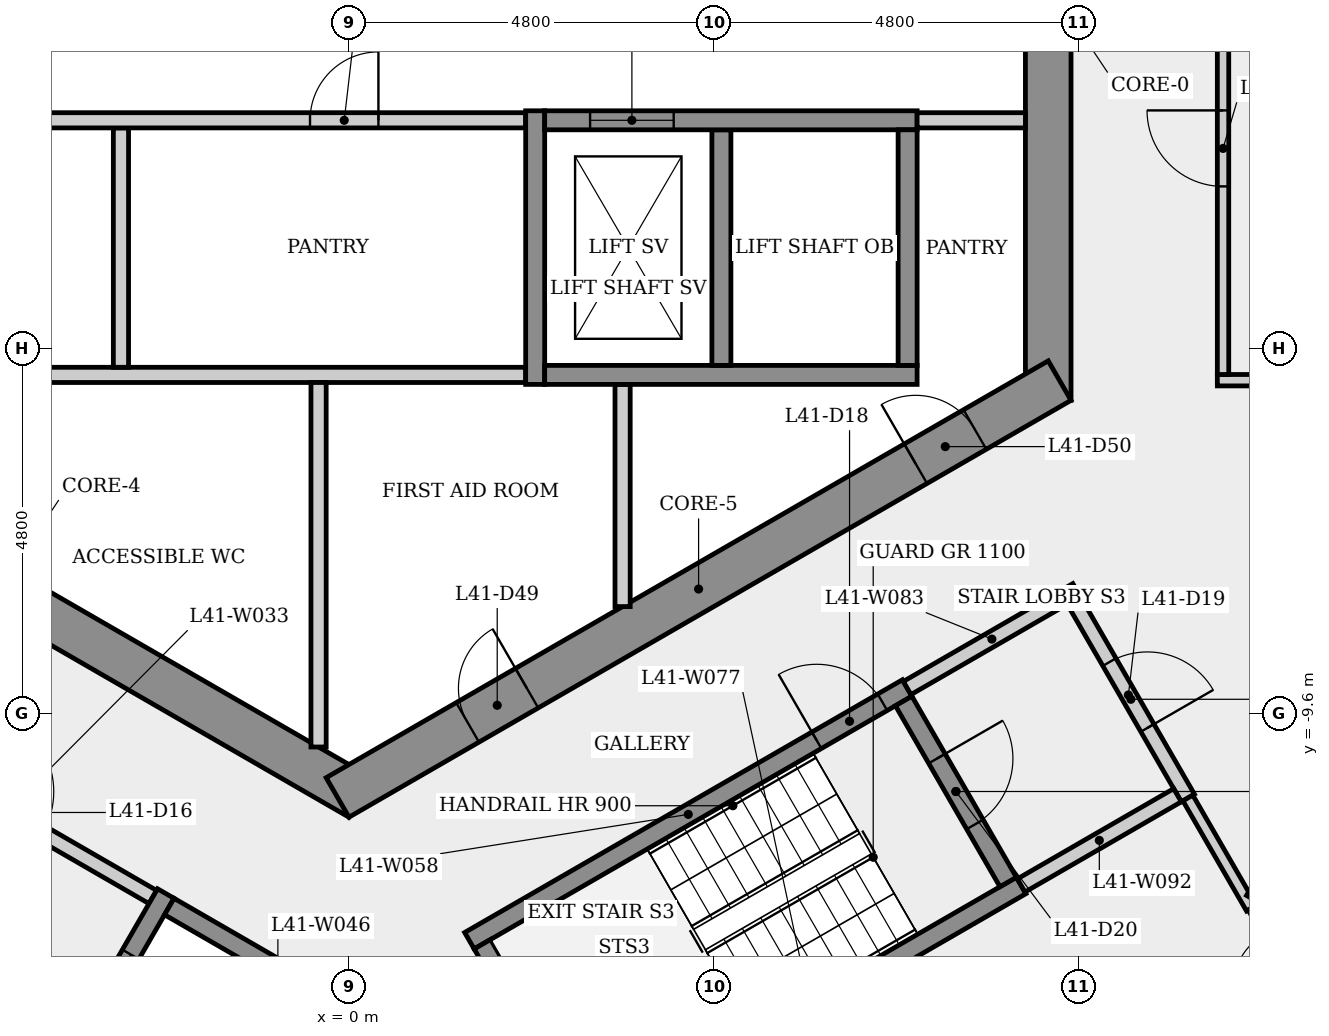
"""IFC4 building model, lengths in metres.
Left out: names, types, materials, properties, quantities, classifications, styles, units other than length and angle.
Written with IfcOpenShell. Run it as: python <this file> out.ifc"""

import sys

from ifc_helpers import new_model, si_unit, direction, frame, frame_2d, origin, place, context, subcontext, project, spatial, rectangle, extrude, element, fill, save


model = new_model("IFC4")
c1 = context("Model", 3, precision=1e-05, world=origin(), true_north=direction((0.0, 1.0)))
c2 = subcontext(c1, "Body", "Model", "MODEL_VIEW")
j1 = project(units=[si_unit("LENGTHUNIT", "METRE"), si_unit("PLANEANGLEUNIT", "RADIAN")], contexts=[c1])
p1 = place(None, origin())
s1 = spatial("IfcSite", under=j1, at=p1, CompositionType="ELEMENT")
p2 = place(p1, origin())
s2 = spatial("IfcBuilding", under=s1, at=p2, CompositionType="ELEMENT")
p3 = place(p2, frame((0.0, 0.0, 156.1)))
s3 = spatial("IfcBuildingStorey", under=s2, at=p3, CompositionType="ELEMENT", Elevation=156.1)
p4 = place(p3, frame((9.2, -5.485, 0.0), z_axis=(0.0, 0.0, 1.0), x_axis=(0.0, 1.0, 0.0)))
e1 = element("IfcWall", 1, at=p4, inside=s3, PredefinedType="SHEAR", context=c2, shape_type="SweptSolid", body=[
    extrude(rectangle(XDim=10.97, YDim=0.6, at=frame_2d((5.485, 0.0))), origin(), (0.0, 0.0, 1.0), 3.4),
])
p5 = place(p4, frame((4.685, 0.0, 0.0)))
e2 = element("IfcOpeningElement", 2, at=p5, cuts=e1, PredefinedType="OPENING", context=c2, shape_type="SweptSolid", body=[
    extrude(rectangle(XDim=1.6, YDim=2.1, at=frame_2d((0.8, 1.05))), frame((0.0, 0.31, 0.0), z_axis=(0.0, -1.0, 0.0), x_axis=(1.0, 0.0, 0.0)), (0.0, 0.0, 1.0), 0.62),
])
p6 = place(p3, frame((-9.35, -5.225, 0.0), z_axis=(0.0, 0.0, 1.0), x_axis=(0.866023993627, -0.500002442456, 0.0)))
e3 = element("IfcWall", 3, at=p6, inside=s3, PredefinedType="SHEAR", context=c2, shape_type="SweptSolid", body=[
    extrude(rectangle(XDim=10.97, YDim=0.6, at=frame_2d((5.485, 0.0))), origin(), (0.0, 0.0, 1.0), 3.4),
])
p7 = place(p6, frame((4.816, 0.0, 0.0)))
e4 = element("IfcOpeningElement", 4, at=p7, cuts=e3, PredefinedType="OPENING", context=c2, shape_type="SweptSolid", body=[
    extrude(rectangle(XDim=0.9, YDim=2.1, at=frame_2d((0.45, 1.05))), frame((0.0, 0.31, 0.0), z_axis=(0.0, -1.0, 0.0), x_axis=(1.0, 0.0, 0.0)), (0.0, 0.0, 1.0), 0.62),
])
p8 = place(p3, frame((-0.15, -10.71, 0.0), z_axis=(0.0, 0.0, 1.0), x_axis=(0.866023993627, 0.500002442456, 0.0)))
e5 = element("IfcWall", 5, at=p8, inside=s3, PredefinedType="SHEAR", context=c2, shape_type="SweptSolid", body=[
    extrude(rectangle(XDim=10.97, YDim=0.6, at=frame_2d((5.485, 0.0))), origin(), (0.0, 0.0, 1.0), 3.4),
])
p9 = place(p8, frame((1.975, 0.0, 0.0)))
e6 = element("IfcOpeningElement", 6, at=p9, cuts=e5, PredefinedType="OPENING", context=c2, shape_type="SweptSolid", body=[
    extrude(rectangle(XDim=0.9, YDim=2.1, at=frame_2d((0.45, 1.05))), frame((0.0, 0.31, 0.0), z_axis=(0.0, -1.0, 0.0), x_axis=(1.0, 0.0, 0.0)), (0.0, 0.0, 1.0), 0.62),
])
p10 = place(p8, frame((8.782, 0.0, 0.0)))
e7 = element("IfcOpeningElement", 7, at=p10, cuts=e5, PredefinedType="OPENING", context=c2, shape_type="SweptSolid", body=[
    extrude(rectangle(XDim=0.9, YDim=2.1, at=frame_2d((0.45, 1.05))), frame((0.0, 0.31, 0.0), z_axis=(0.0, -1.0, 0.0), x_axis=(1.0, 0.0, 0.0)), (0.0, 0.0, 1.0), 0.62),
])
p11 = place(p3, frame((-8.88, -5.15, 0.0), z_axis=(0.0, 0.0, 1.0), x_axis=(1.0, 0.0, 0.0)))
e8 = element("IfcWall", 8, at=p11, inside=s3, PredefinedType="PARTITIONING", context=c2, shape_type="SweptSolid", body=[
    extrude(rectangle(XDim=11.205, YDim=0.2, at=frame_2d((5.603, 0.0))), origin(), (0.0, 0.0, 1.0), 3.05),
])
p12 = place(p3, frame((-6.435, -9.795, 0.0), z_axis=(0.0, 0.0, 1.0), x_axis=(0.866012907634, -0.500021643343, 0.0)))
e9 = element("IfcWall", 9, at=p12, inside=s3, PredefinedType="PARTITIONING", context=c2, shape_type="SweptSolid", body=[
    extrude(rectangle(XDim=4.45, YDim=0.2, at=frame_2d((2.225, 0.0))), origin(), (0.0, 0.0, 1.0), 3.05),
])
p13 = place(p12, frame((1.675, 0.0, 0.0)))
e10 = element("IfcOpeningElement", 10, at=p13, cuts=e9, PredefinedType="OPENING", context=c2, shape_type="SweptSolid", body=[
    extrude(rectangle(XDim=1.1, YDim=2.1, at=frame_2d((0.55, 1.05))), frame((0.0, 0.11, 0.0), z_axis=(0.0, -1.0, 0.0), x_axis=(1.0, 0.0, 0.0)), (0.0, 0.0, 1.0), 0.22),
])
p14 = place(p3, frame((-3.0, -1.9, 0.0), z_axis=(0.0, 0.0, 1.0), x_axis=(0.0, -1.0, 0.0)))
e11 = element("IfcWall", 11, at=p14, inside=s3, PredefinedType="PARTITIONING", context=c2, shape_type="SweptSolid", body=[
    extrude(rectangle(XDim=3.15, YDim=0.2, at=frame_2d((1.575, 0.0))), origin(), (0.0, 0.0, 1.0), 3.05),
])
p15 = place(p3, frame((-8.9, -1.8, 0.0), z_axis=(0.0, 0.0, 1.0), x_axis=(1.0, 0.0, 0.0)))
e12 = element("IfcWall", 12, at=p15, inside=s3, PredefinedType="PARTITIONING", context=c2, shape_type="SweptSolid", body=[
    extrude(rectangle(XDim=11.225, YDim=0.2, at=frame_2d((5.613, 0.0))), origin(), (0.0, 0.0, 1.0), 3.05),
])
p16 = place(p15, frame((2.485, 0.0, 0.0)))
e13 = element("IfcOpeningElement", 13, at=p16, cuts=e12, PredefinedType="OPENING", context=c2, shape_type="SweptSolid", body=[
    extrude(rectangle(XDim=0.9, YDim=2.1, at=frame_2d((0.45, 1.05))), frame((0.0, 0.11, 0.0), z_axis=(0.0, -1.0, 0.0), x_axis=(1.0, 0.0, 0.0)), (0.0, 0.0, 1.0), 0.22),
])
p17 = place(p15, frame((8.387, 0.0, 0.0)))
e14 = element("IfcOpeningElement", 14, at=p17, cuts=e12, PredefinedType="OPENING", context=c2, shape_type="SweptSolid", body=[
    extrude(rectangle(XDim=0.9, YDim=2.1, at=frame_2d((0.45, 1.05))), frame((0.0, 0.11, 0.0), z_axis=(0.0, -1.0, 0.0), x_axis=(1.0, 0.0, 0.0)), (0.0, 0.0, 1.0), 0.22),
])
p18 = place(p3, frame((-2.41, -11.974, 0.0), z_axis=(0.0, 0.0, 1.0), x_axis=(-0.500001826776, -0.866024349092, 0.0)))
e15 = element("IfcWall", 15, at=p18, inside=s3, PredefinedType="SHEAR", context=c2, shape_type="SweptSolid", body=[
    extrude(rectangle(XDim=2.95, YDim=0.25, at=frame_2d((1.475, 0.0))), origin(), (0.0, 0.0, 1.0), 3.05),
])
p19 = place(p18, frame((0.925, 0.0, 0.0)))
e16 = element("IfcOpeningElement", 16, at=p19, cuts=e15, PredefinedType="OPENING", context=c2, shape_type="SweptSolid", body=[
    extrude(rectangle(XDim=1.1, YDim=2.1, at=frame_2d((0.55, 1.05))), frame((0.0, 0.135, 0.0), z_axis=(0.0, -1.0, 0.0), x_axis=(1.0, 0.0, 0.0)), (0.0, 0.0, 1.0), 0.27),
])
p20 = place(p3, frame((-2.364, -12.145, 0.0), z_axis=(0.0, 0.0, 1.0), x_axis=(0.866040211805, -0.499974350878, 0.0)))
e17 = element("IfcWall", 17, at=p20, inside=s3, PredefinedType="SHEAR", context=c2, shape_type="SweptSolid", body=[
    extrude(rectangle(XDim=3.3, YDim=0.25, at=frame_2d((1.65, 0.0))), origin(), (0.0, 0.0, 1.0), 3.05),
])
p21 = place(p3, frame((-0.4, -5.25, 0.0), z_axis=(0.0, 0.0, 1.0), x_axis=(0.0, -1.0, 0.0)))
e18 = element("IfcWall", 18, at=p21, inside=s3, PredefinedType="PARTITIONING", context=c2, shape_type="SweptSolid", body=[
    extrude(rectangle(XDim=4.796, YDim=0.2, at=frame_2d((2.398, 0.0))), origin(), (0.0, 0.0, 1.0), 3.05),
])
p22 = place(p3, frame((1.585, -12.595, 0.0), z_axis=(0.0, 0.0, 1.0), x_axis=(0.866036417653, 0.499980922934, 0.0)))
e19 = element("IfcWall", 19, at=p22, inside=s3, PredefinedType="SHEAR", context=c2, shape_type="SweptSolid", body=[
    extrude(rectangle(XDim=6.65, YDim=0.25, at=frame_2d((3.325, 0.0))), origin(), (0.0, 0.0, 1.0), 3.05),
])
p23 = place(p22, frame((5.275, 0.0, 0.0)))
e20 = element("IfcOpeningElement", 20, at=p23, cuts=e19, PredefinedType="OPENING", context=c2, shape_type="SweptSolid", body=[
    extrude(rectangle(XDim=1.0, YDim=2.1, at=frame_2d((0.5, 1.05))), frame((0.0, 0.135, 0.0), z_axis=(0.0, -1.0, 0.0), x_axis=(1.0, 0.0, 0.0)), (0.0, 0.0, 1.0), 0.27),
])
p24 = place(p3, frame((2.45, -5.275, 0.0), z_axis=(0.0, 0.0, 1.0), x_axis=(0.0, 1.0, 0.0)))
e21 = element("IfcWall", 21, at=p24, inside=s3, PredefinedType="SHEAR", context=c2, shape_type="SweptSolid", body=[
    extrude(rectangle(XDim=3.6, YDim=0.25, at=frame_2d((1.8, 0.0))), origin(), (0.0, 0.0, 1.0), 3.05),
])
p25 = place(p3, frame((3.256, -15.239, 0.0), z_axis=(0.0, 0.0, 1.0), x_axis=(-0.50002537861, 0.866010750942, 0.0)))
e22 = element("IfcWall", 22, at=p25, inside=s3, PredefinedType="SHEAR", context=c2, shape_type="SweptSolid", body=[
    extrude(rectangle(XDim=3.0, YDim=0.25, at=frame_2d((1.5, 0.0))), origin(), (0.0, 0.0, 1.0), 3.05),
])
p26 = place(p3, frame((3.6, -5.275, 0.0), z_axis=(0.0, 0.0, 1.0), x_axis=(0.0, -1.0, 0.0)))
e23 = element("IfcWall", 23, at=p26, inside=s3, PredefinedType="PARTITIONING", context=c2, shape_type="SweptSolid", body=[
    extrude(rectangle(XDim=2.924, YDim=0.2, at=frame_2d((1.462, 0.0))), origin(), (0.0, 0.0, 1.0), 3.05),
])
p27 = place(p3, frame((2.575, -5.15, 0.0), z_axis=(0.0, 0.0, 1.0), x_axis=(1.0, 0.0, 0.0)))
e24 = element("IfcWall", 24, at=p27, inside=s3, PredefinedType="SHEAR", context=c2, shape_type="SweptSolid", body=[
    extrude(rectangle(XDim=4.9, YDim=0.25, at=frame_2d((2.45, 0.0))), origin(), (0.0, 0.0, 1.0), 3.05),
])
p28 = place(p3, frame((4.9, -1.925, 0.0), z_axis=(0.0, 0.0, 1.0), x_axis=(0.0, -1.0, 0.0)))
e25 = element("IfcWall", 25, at=p28, inside=s3, PredefinedType="SHEAR", context=c2, shape_type="SweptSolid", body=[
    extrude(rectangle(XDim=3.1, YDim=0.25, at=frame_2d((1.55, 0.0))), origin(), (0.0, 0.0, 1.0), 3.4),
])
p29 = place(p3, frame((2.575, -1.8, 0.0), z_axis=(0.0, 0.0, 1.0), x_axis=(1.0, 0.0, 0.0)))
e26 = element("IfcWall", 26, at=p29, inside=s3, PredefinedType="SHEAR", context=c2, shape_type="SweptSolid", body=[
    extrude(rectangle(XDim=4.9, YDim=0.25, at=frame_2d((2.45, 0.0))), origin(), (0.0, 0.0, 1.0), 3.05),
])
p30 = place(p29, frame((0.597, 0.0, 0.0)))
e27 = element("IfcOpeningElement", 27, at=p30, cuts=e26, PredefinedType="OPENING", context=c2, shape_type="SweptSolid", body=[
    extrude(rectangle(XDim=1.1, YDim=2.1, at=frame_2d((0.55, 1.05))), frame((0.0, 0.135, 0.0), z_axis=(0.0, -1.0, 0.0), x_axis=(1.0, 0.0, 0.0)), (0.0, 0.0, 1.0), 0.27),
])
p31 = place(p3, frame((3.301, -15.068, 0.0), z_axis=(0.0, 0.0, 1.0), x_axis=(0.866035036182, 0.499983315828, 0.0)))
e28 = element("IfcWall", 28, at=p31, inside=s3, PredefinedType="SHEAR", context=c2, shape_type="SweptSolid", body=[
    extrude(rectangle(XDim=6.4, YDim=0.25, at=frame_2d((3.2, 0.0))), origin(), (0.0, 0.0, 1.0), 3.05),
])
p32 = place(p3, frame((7.298, -9.441, 0.0), z_axis=(0.0, 0.0, 1.0), x_axis=(0.500034990121, -0.866005201286, 0.0)))
e29 = element("IfcWall", 29, at=p32, inside=s3, PredefinedType="SHEAR", context=c2, shape_type="SweptSolid", body=[
    extrude(rectangle(XDim=2.75, YDim=0.25, at=frame_2d((1.375, 0.0))), origin(), (0.0, 0.0, 1.0), 3.05),
])
p33 = place(p32, frame((0.875, 0.0, 0.0)))
e30 = element("IfcOpeningElement", 30, at=p33, cuts=e29, PredefinedType="OPENING", context=c2, shape_type="SweptSolid", body=[
    extrude(rectangle(XDim=1.0, YDim=2.1, at=frame_2d((0.5, 1.05))), frame((0.0, 0.135, 0.0), z_axis=(0.0, -1.0, 0.0), x_axis=(1.0, 0.0, 0.0)), (0.0, 0.0, 1.0), 0.27),
])
p34 = place(p3, frame((7.344, -9.27, 0.0), z_axis=(0.0, 0.0, 1.0), x_axis=(0.866005588531, 0.500034319456, 0.0)))
e31 = element("IfcWall", 31, at=p34, inside=s3, PredefinedType="PARTITIONING", context=c2, shape_type="SweptSolid", body=[
    extrude(rectangle(XDim=2.575, YDim=0.2, at=frame_2d((1.288, 0.0))), origin(), (0.0, 0.0, 1.0), 3.05),
])
p35 = place(p3, frame((7.35, -1.925, 0.0), z_axis=(0.0, 0.0, 1.0), x_axis=(0.0, -1.0, 0.0)))
e32 = element("IfcWall", 32, at=p35, inside=s3, PredefinedType="SHEAR", context=c2, shape_type="SweptSolid", body=[
    extrude(rectangle(XDim=3.1, YDim=0.25, at=frame_2d((1.55, 0.0))), origin(), (0.0, 0.0, 1.0), 3.4),
])
p36 = place(p3, frame((8.9, -1.8, 0.0), z_axis=(0.0, 0.0, 1.0), x_axis=(-1.0, 0.0, 0.0)))
e33 = element("IfcWall", 33, at=p36, inside=s3, PredefinedType="PARTITIONING", context=c2, shape_type="SweptSolid", body=[
    extrude(rectangle(XDim=1.425, YDim=0.2, at=frame_2d((0.712, 0.0))), origin(), (0.0, 0.0, 1.0), 3.05),
])
p37 = place(p3, frame((9.537, -8.119, 0.0), z_axis=(0.0, 0.0, 1.0), x_axis=(0.499990139034, -0.866031096941, 0.0)))
e34 = element("IfcWall", 34, at=p37, inside=s3, PredefinedType="PARTITIONING", context=c2, shape_type="SweptSolid", body=[
    extrude(rectangle(XDim=3.0, YDim=0.2, at=frame_2d((1.5, 0.0))), origin(), (0.0, 0.0, 1.0), 3.05),
])
p38 = place(p37, frame((0.935, 0.0, 0.0)))
e35 = element("IfcOpeningElement", 35, at=p38, cuts=e34, PredefinedType="OPENING", context=c2, shape_type="SweptSolid", body=[
    extrude(rectangle(XDim=1.0, YDim=2.1, at=frame_2d((0.5, 1.05))), frame((0.0, 0.11, 0.0), z_axis=(0.0, -1.0, 0.0), x_axis=(1.0, 0.0, 0.0)), (0.0, 0.0, 1.0), 0.22),
])
p39 = place(p3, frame((10.901, -10.681, 0.0), z_axis=(0.0, 0.0, 1.0), x_axis=(-0.866007538022, -0.500030943131, 0.0)))
e36 = element("IfcWall", 36, at=p39, inside=s3, PredefinedType="PARTITIONING", context=c2, shape_type="SweptSolid", body=[
    extrude(rectangle(XDim=2.375, YDim=0.2, at=frame_2d((1.188, 0.0))), origin(), (0.0, 0.0, 1.0), 3.05),
])
p40 = place(p3, frame((11.425, -5.22, 0.0), z_axis=(0.0, 0.0, 1.0), x_axis=(1.0, 0.0, 0.0)))
e37 = element("IfcWall", 37, at=p40, inside=s3, PredefinedType="PARTITIONING", context=c2, shape_type="SweptSolid", body=[
    extrude(rectangle(XDim=4.46, YDim=0.15, at=frame_2d((2.23, 0.0))), origin(), (0.0, 0.0, 1.0), 3.05),
])
p41 = place(p3, frame((11.5, -5.145, 0.0), z_axis=(0.0, 0.0, 1.0), x_axis=(0.0, 1.0, 0.0)))
e38 = element("IfcWall", 38, at=p41, inside=s3, PredefinedType="PARTITIONING", context=c2, shape_type="SweptSolid", body=[
    extrude(rectangle(XDim=10.439, YDim=0.15, at=frame_2d((5.22, 0.0))), origin(), (0.0, 0.0, 1.0), 3.05),
])
p42 = place(p41, frame((2.475, 0.0, 0.0)))
e39 = element("IfcOpeningElement", 39, at=p42, cuts=e38, PredefinedType="OPENING", context=c2, shape_type="SweptSolid", body=[
    extrude(rectangle(XDim=1.0, YDim=2.1, at=frame_2d((0.5, 1.05))), frame((0.0, 0.085, 0.0), z_axis=(0.0, -1.0, 0.0), x_axis=(1.0, 0.0, 0.0)), (0.0, 0.0, 1.0), 0.17),
])
p43 = place(p41, frame((8.109, 0.0, 0.0)))
e40 = element("IfcOpeningElement", 40, at=p43, cuts=e38, PredefinedType="OPENING", context=c2, shape_type="SweptSolid", body=[
    extrude(rectangle(XDim=1.0, YDim=2.1, at=frame_2d((0.5, 1.05))), frame((0.0, 0.085, 0.0), z_axis=(0.0, -1.0, 0.0), x_axis=(1.0, 0.0, 0.0)), (0.0, 0.0, 1.0), 0.17),
])
p44 = place(p3, frame((11.874, -12.167, 0.0), z_axis=(0.0, 0.0, 1.0), x_axis=(-0.499920289095, 0.866071420006, 0.0)))
e41 = element("IfcWall", 41, at=p44, inside=s3, PredefinedType="PARTITIONING", context=c2, shape_type="SweptSolid", body=[
    extrude(rectangle(XDim=1.674, YDim=0.15, at=frame_2d((0.837, 0.0))), origin(), (0.0, 0.0, 1.0), 3.05),
])
p45 = place(p3, frame((12.936, -14.007, 0.0), z_axis=(0.0, 0.0, 1.0), x_axis=(-0.499957859296, 0.866049732364, 0.0)))
e42 = element("IfcWall", 42, at=p45, inside=s3, PredefinedType="PARTITIONING", context=c2, shape_type="SweptSolid", body=[
    extrude(rectangle(XDim=2.125, YDim=0.1, at=frame_2d((1.062, 0.0))), origin(), (0.0, 0.0, 1.0), 3.05),
])
p46 = place(p45, frame((0.848, 0.0, 0.0)))
e43 = element("IfcOpeningElement", 43, at=p46, cuts=e42, PredefinedType="OPENING", context=c2, shape_type="SweptSolid", body=[
    extrude(rectangle(XDim=0.9, YDim=2.1, at=frame_2d((0.45, 1.05))), frame((0.0, 0.06, 0.0), z_axis=(0.0, -1.0, 0.0), x_axis=(1.0, 0.0, 0.0)), (0.0, 0.0, 1.0), 0.12),
])
p47 = place(p3, frame((15.772, -5.285, 0.0), z_axis=(0.0, 0.0, 1.0), x_axis=(-0.500018810599, -0.866014543207, 0.0)))
e44 = element("IfcWall", 44, at=p47, inside=s3, PredefinedType="PARTITIONING", context=c2, shape_type="SweptSolid", body=[
    extrude(rectangle(XDim=7.797, YDim=0.15, at=frame_2d((3.898, 0.0))), origin(), (0.0, 0.0, 1.0), 3.05),
])
p48 = place(p47, frame((3.398, 0.0, 0.0)))
e45 = element("IfcOpeningElement", 45, at=p48, cuts=e44, PredefinedType="OPENING", context=c2, shape_type="SweptSolid", body=[
    extrude(rectangle(XDim=1.0, YDim=2.1, at=frame_2d((0.5, 1.05))), frame((0.0, 0.085, 0.0), z_axis=(0.0, -1.0, 0.0), x_axis=(1.0, 0.0, 0.0)), (0.0, 0.0, 1.0), 0.17),
])
p49 = place(p30, origin())
e46 = element("IfcDoor", 46, at=p49, inside=s3, OperationType="SLIDING_TO_LEFT", PredefinedType="DOOR", context=c2, shape_type="SweptSolid", body=[
    extrude(rectangle(XDim=1.1, YDim=2.1, at=frame_2d((0.55, 1.05))), frame((0.0, 0.025, 0.0), z_axis=(0.0, -1.0, 0.0), x_axis=(1.0, 0.0, 0.0)), (0.0, 0.0, 1.0), 0.05),
])
fill(e27, e46)
p50 = place(p17, origin())
e47 = element("IfcDoor", 47, at=p50, inside=s3, OperationType="SINGLE_SWING_RIGHT", PredefinedType="DOOR", context=c2, shape_type="SweptSolid", body=[
    extrude(rectangle(XDim=0.9, YDim=2.1, at=frame_2d((0.45, 1.05))), frame((0.0, 0.025, 0.0), z_axis=(0.0, -1.0, 0.0), x_axis=(1.0, 0.0, 0.0)), (0.0, 0.0, 1.0), 0.05),
])
fill(e14, e47)
p51 = place(p19, origin())
e48 = element("IfcDoor", 48, at=p51, inside=s3, OperationType="SLIDING_TO_LEFT", PredefinedType="DOOR", context=c2, shape_type="SweptSolid", body=[
    extrude(rectangle(XDim=1.1, YDim=2.1, at=frame_2d((0.55, 1.05))), frame((0.0, 0.025, 0.0), z_axis=(0.0, -1.0, 0.0), x_axis=(1.0, 0.0, 0.0)), (0.0, 0.0, 1.0), 0.05),
])
fill(e16, e48)
p52 = place(p23, origin())
e49 = element("IfcDoor", 49, at=p52, inside=s3, OperationType="SINGLE_SWING_LEFT", PredefinedType="DOOR", context=c2, shape_type="SweptSolid", body=[
    extrude(rectangle(XDim=1.0, YDim=2.1, at=frame_2d((0.5, 1.05))), frame((0.0, 0.025, 0.0), z_axis=(0.0, -1.0, 0.0), x_axis=(1.0, 0.0, 0.0)), (0.0, 0.0, 1.0), 0.05),
])
fill(e20, e49)
p53 = place(p38, origin())
e50 = element("IfcDoor", 50, at=p53, inside=s3, OperationType="SINGLE_SWING_RIGHT", PredefinedType="DOOR", context=c2, shape_type="SweptSolid", body=[
    extrude(rectangle(XDim=1.0, YDim=2.1, at=frame_2d((0.5, 1.05))), frame((0.0, 0.025, 0.0), z_axis=(0.0, -1.0, 0.0), x_axis=(1.0, 0.0, 0.0)), (0.0, 0.0, 1.0), 0.05),
])
fill(e35, e50)
p54 = place(p33, origin())
e51 = element("IfcDoor", 51, at=p54, inside=s3, OperationType="SINGLE_SWING_LEFT", PredefinedType="DOOR", context=c2, shape_type="SweptSolid", body=[
    extrude(rectangle(XDim=1.0, YDim=2.1, at=frame_2d((0.5, 1.05))), frame((0.0, 0.025, 0.0), z_axis=(0.0, -1.0, 0.0), x_axis=(1.0, 0.0, 0.0)), (0.0, 0.0, 1.0), 0.05),
])
fill(e30, e51)
p55 = place(p42, origin())
e52 = element("IfcDoor", 52, at=p55, inside=s3, OperationType="SINGLE_SWING_RIGHT", PredefinedType="DOOR", context=c2, shape_type="SweptSolid", body=[
    extrude(rectangle(XDim=1.0, YDim=2.1, at=frame_2d((0.5, 1.05))), frame((0.0, 0.025, 0.0), z_axis=(0.0, -1.0, 0.0), x_axis=(1.0, 0.0, 0.0)), (0.0, 0.0, 1.0), 0.05),
])
fill(e39, e52)
p56 = place(p9, origin())
e53 = element("IfcDoor", 53, at=p56, inside=s3, OperationType="SINGLE_SWING_RIGHT", PredefinedType="DOOR", context=c2, shape_type="SweptSolid", body=[
    extrude(rectangle(XDim=0.9, YDim=2.1, at=frame_2d((0.45, 1.05))), frame((0.0, 0.025, 0.0), z_axis=(0.0, -1.0, 0.0), x_axis=(1.0, 0.0, 0.0)), (0.0, 0.0, 1.0), 0.05),
])
fill(e6, e53)
p57 = place(p10, origin())
e54 = element("IfcDoor", 54, at=p57, inside=s3, OperationType="SINGLE_SWING_LEFT", PredefinedType="DOOR", context=c2, shape_type="SweptSolid", body=[
    extrude(rectangle(XDim=0.9, YDim=2.1, at=frame_2d((0.45, 1.05))), frame((0.0, 0.025, 0.0), z_axis=(0.0, -1.0, 0.0), x_axis=(1.0, 0.0, 0.0)), (0.0, 0.0, 1.0), 0.05),
])
fill(e7, e54)
save(model, sys.argv[1])
